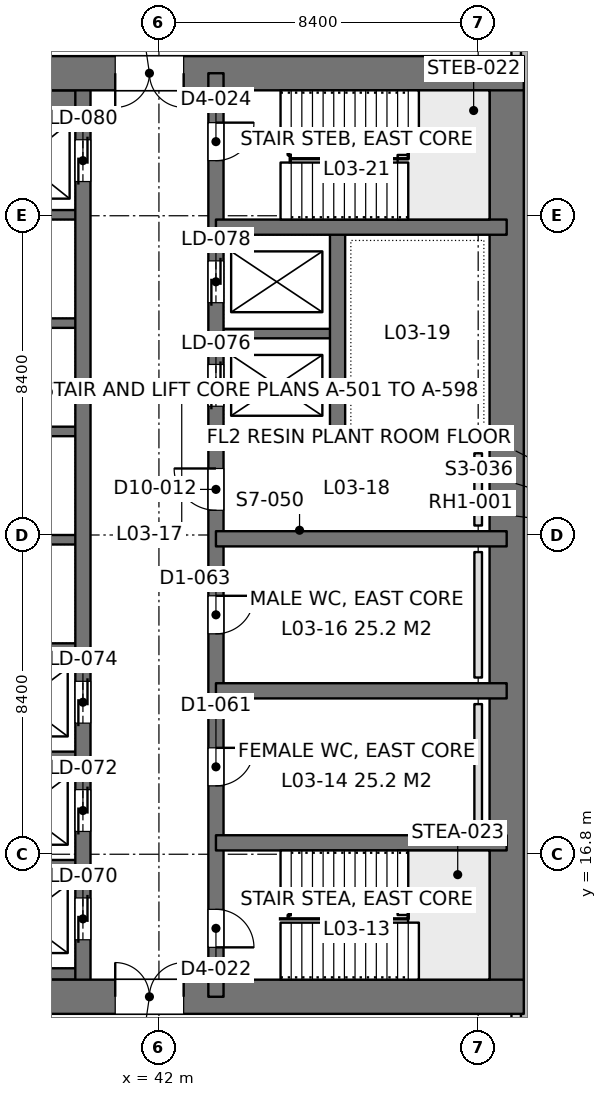
"""IFC4 building model, lengths in metres.
Left out: names, types, materials, properties, quantities, classifications, styles, units other than length and angle.
Written with IfcOpenShell. Run it as: python <this file> out.ifc"""

import sys

from ifc_helpers import new_model, si_unit, direction, frame, frame_2d, origin, place, context, subcontext, project, spatial, rectangle, extrude, element, fill, save


model = new_model("IFC4")
c1 = context("Model", 3, precision=1e-05, world=origin(), true_north=direction((0.0, 1.0)))
c2 = subcontext(c1, "Body", "Model", "MODEL_VIEW")
j1 = project(units=[si_unit("LENGTHUNIT", "METRE"), si_unit("PLANEANGLEUNIT", "RADIAN")], contexts=[c1])
p1 = place(None, origin())
s1 = spatial("IfcSite", under=j1, at=p1, CompositionType="ELEMENT")
p2 = place(p1, origin())
s2 = spatial("IfcBuilding", under=s1, at=p2, CompositionType="ELEMENT")
p3 = place(p2, frame((0.0, 0.0, 14.4)))
s3 = spatial("IfcBuildingStorey", under=s2, at=p3, CompositionType="ELEMENT", Elevation=14.4)
p4 = place(p3, frame((33.6, 13.05, 0.0), z_axis=(0.0, 0.0, 1.0), x_axis=(1.0, 0.0, 0.0)))
e1 = element("IfcWall", 1, at=p4, inside=s3, PredefinedType="SHEAR", context=c2, shape_type="SweptSolid", body=[
    extrude(rectangle(XDim=18.0, YDim=0.9, at=frame_2d((9.0, 0.0))), origin(), (0.0, 0.0, 1.0), 4.5),
])
p5 = place(p4, frame((7.25, 0.0, 0.0)))
e2 = element("IfcOpeningElement", 2, at=p5, cuts=e1, PredefinedType="OPENING", context=c2, shape_type="SweptSolid", body=[
    extrude(rectangle(XDim=1.8, YDim=2.4, at=frame_2d((0.9, 1.2))), frame((0.0, 0.46, 0.0), z_axis=(0.0, -1.0, 0.0), x_axis=(1.0, 0.0, 0.0)), (0.0, 0.0, 1.0), 0.92),
])
p6 = place(p3, frame((33.6, 37.35, 0.0), z_axis=(0.0, 0.0, 1.0), x_axis=(1.0, 0.0, 0.0)))
e3 = element("IfcWall", 3, at=p6, inside=s3, PredefinedType="SHEAR", context=c2, shape_type="SweptSolid", body=[
    extrude(rectangle(XDim=18.0, YDim=0.9, at=frame_2d((9.0, 0.0))), origin(), (0.0, 0.0, 1.0), 4.5),
])
p7 = place(p6, frame((7.25, 0.0, 0.0)))
e4 = element("IfcOpeningElement", 4, at=p7, cuts=e3, PredefinedType="OPENING", context=c2, shape_type="SweptSolid", body=[
    extrude(rectangle(XDim=1.8, YDim=2.4, at=frame_2d((0.9, 1.2))), frame((0.0, 0.46, 0.0), z_axis=(0.0, -1.0, 0.0), x_axis=(1.0, 0.0, 0.0)), (0.0, 0.0, 1.0), 0.92),
])
p8 = place(p3, frame((51.15, 13.05, 0.0), z_axis=(0.0, 0.0, 1.0), x_axis=(0.0, 1.0, 0.0)))
e5 = element("IfcWall", 5, at=p8, inside=s3, PredefinedType="SHEAR", context=c2, shape_type="SweptSolid", body=[
    extrude(rectangle(XDim=24.3, YDim=0.9, at=frame_2d((12.15, 0.0))), origin(), (0.0, 0.0, 1.0), 4.5),
])
p9 = place(p3, frame((43.5, 13.05, 0.0), z_axis=(0.0, 0.0, 1.0), x_axis=(0.0, 1.0, 0.0)))
e6 = element("IfcWall", 6, at=p9, inside=s3, PredefinedType="SHEAR", context=c2, shape_type="SweptSolid", body=[
    extrude(rectangle(XDim=24.3, YDim=0.4, at=frame_2d((12.15, 0.0))), origin(), (0.0, 0.0, 1.0), 4.5),
])
p10 = place(p9, frame((1.3, 0.0, 0.0)))
e7 = element("IfcOpeningElement", 7, at=p10, cuts=e6, PredefinedType="OPENING", context=c2, shape_type="SweptSolid", body=[
    extrude(rectangle(XDim=1.0, YDim=2.2, at=frame_2d((0.5, 1.1))), frame((0.0, 0.21, 0.0), z_axis=(0.0, -1.0, 0.0), x_axis=(1.0, 0.0, 0.0)), (0.0, 0.0, 1.0), 0.42),
])
p11 = place(p9, frame((22.0, 0.0, 0.0)))
e8 = element("IfcOpeningElement", 8, at=p11, cuts=e6, PredefinedType="OPENING", context=c2, shape_type="SweptSolid", body=[
    extrude(rectangle(XDim=1.0, YDim=2.2, at=frame_2d((0.5, 1.1))), frame((0.0, 0.21, 0.0), z_axis=(0.0, -1.0, 0.0), x_axis=(1.0, 0.0, 0.0)), (0.0, 0.0, 1.0), 0.42),
])
p12 = place(p9, frame((5.55, 0.0, 0.0)))
e9 = element("IfcOpeningElement", 9, at=p12, cuts=e6, PredefinedType="OPENING", context=c2, shape_type="SweptSolid", body=[
    extrude(rectangle(XDim=1.0, YDim=2.2, at=frame_2d((0.5, 1.1))), frame((0.0, 0.21, 0.0), z_axis=(0.0, -1.0, 0.0), x_axis=(1.0, 0.0, 0.0)), (0.0, 0.0, 1.0), 0.42),
])
p13 = place(p9, frame((9.55, 0.0, 0.0)))
e10 = element("IfcOpeningElement", 10, at=p13, cuts=e6, PredefinedType="OPENING", context=c2, shape_type="SweptSolid", body=[
    extrude(rectangle(XDim=1.0, YDim=2.2, at=frame_2d((0.5, 1.1))), frame((0.0, 0.21, 0.0), z_axis=(0.0, -1.0, 0.0), x_axis=(1.0, 0.0, 0.0)), (0.0, 0.0, 1.0), 0.42),
])
p14 = place(p9, frame((12.8, 0.0, 0.0)))
e11 = element("IfcOpeningElement", 11, at=p14, cuts=e6, PredefinedType="OPENING", context=c2, shape_type="SweptSolid", body=[
    extrude(rectangle(XDim=1.1, YDim=2.2, at=frame_2d((0.55, 1.1))), frame((0.0, 0.21, 0.0), z_axis=(0.0, -1.0, 0.0), x_axis=(1.0, 0.0, 0.0)), (0.0, 0.0, 1.0), 0.42),
])
p15 = place(p9, frame((15.538, 0.0, 0.0)))
e12 = element("IfcOpeningElement", 12, at=p15, cuts=e6, PredefinedType="OPENING", context=c2, shape_type="SweptSolid", body=[
    extrude(rectangle(XDim=1.1, YDim=2.2, at=frame_2d((0.55, 1.1))), frame((0.0, 0.21, 0.0), z_axis=(0.0, -1.0, 0.0), x_axis=(1.0, 0.0, 0.0)), (0.0, 0.0, 1.0), 0.42),
])
p16 = place(p9, frame((18.262, 0.0, 0.0)))
e13 = element("IfcOpeningElement", 13, at=p16, cuts=e6, PredefinedType="OPENING", context=c2, shape_type="SweptSolid", body=[
    extrude(rectangle(XDim=1.1, YDim=2.2, at=frame_2d((0.55, 1.1))), frame((0.0, 0.21, 0.0), z_axis=(0.0, -1.0, 0.0), x_axis=(1.0, 0.0, 0.0)), (0.0, 0.0, 1.0), 0.42),
])
p17 = place(p3, frame((40.0, 13.05, 0.0), z_axis=(0.0, 0.0, 1.0), x_axis=(0.0, 1.0, 0.0)))
e14 = element("IfcWall", 14, at=p17, inside=s3, PredefinedType="SHEAR", context=c2, shape_type="SweptSolid", body=[
    extrude(rectangle(XDim=24.3, YDim=0.4, at=frame_2d((12.15, 0.0))), origin(), (0.0, 0.0, 1.0), 4.5),
])
p18 = place(p17, frame((1.5, 0.0, 0.0)))
e15 = element("IfcOpeningElement", 15, at=p18, cuts=e14, PredefinedType="OPENING", context=c2, shape_type="SweptSolid", body=[
    extrude(rectangle(XDim=1.1, YDim=2.2, at=frame_2d((0.55, 1.1))), frame((0.0, 0.21, 0.0), z_axis=(0.0, -1.0, 0.0), x_axis=(1.0, 0.0, 0.0)), (0.0, 0.0, 1.0), 0.42),
])
p19 = place(p17, frame((4.35, 0.0, 0.0)))
e16 = element("IfcOpeningElement", 16, at=p19, cuts=e14, PredefinedType="OPENING", context=c2, shape_type="SweptSolid", body=[
    extrude(rectangle(XDim=1.1, YDim=2.2, at=frame_2d((0.55, 1.1))), frame((0.0, 0.21, 0.0), z_axis=(0.0, -1.0, 0.0), x_axis=(1.0, 0.0, 0.0)), (0.0, 0.0, 1.0), 0.42),
])
p20 = place(p17, frame((7.2, 0.0, 0.0)))
e17 = element("IfcOpeningElement", 17, at=p20, cuts=e14, PredefinedType="OPENING", context=c2, shape_type="SweptSolid", body=[
    extrude(rectangle(XDim=1.1, YDim=2.2, at=frame_2d((0.55, 1.1))), frame((0.0, 0.21, 0.0), z_axis=(0.0, -1.0, 0.0), x_axis=(1.0, 0.0, 0.0)), (0.0, 0.0, 1.0), 0.42),
])
p21 = place(p17, frame((21.45, 0.0, 0.0)))
e18 = element("IfcOpeningElement", 18, at=p21, cuts=e14, PredefinedType="OPENING", context=c2, shape_type="SweptSolid", body=[
    extrude(rectangle(XDim=1.1, YDim=2.2, at=frame_2d((0.55, 1.1))), frame((0.0, 0.21, 0.0), z_axis=(0.0, -1.0, 0.0), x_axis=(1.0, 0.0, 0.0)), (0.0, 0.0, 1.0), 0.42),
])
for number, where, z_axis, x_axis in (
    (19, (51.15, 17.1, 0.0), (0.0, 0.0, 1.0), (-1.0, 0.0, 0.0)),
    (20, (51.15, 21.1, 0.0), (0.0, 0.0, 1.0), (-1.0, 0.0, 0.0)),
    (21, (51.15, 25.1, 0.0), (0.0, 0.0, 1.0), (-1.0, 0.0, 0.0)),
    (22, (51.15, 27.7, 0.0), (0.0, 0.0, 1.0), (-1.0, 0.0, 0.0)),
    (23, (51.15, 33.3, 0.0), (0.0, 0.0, 1.0), (-1.0, 0.0, 0.0)),
):
    element("IfcWall", number, at=place(p3, frame(where, z_axis=z_axis, x_axis=x_axis)), inside=s3, PredefinedType="SHEAR", context=c2, shape_type="SweptSolid", body=[
        extrude(rectangle(XDim=7.65, YDim=0.4, at=frame_2d((3.825, 0.0))), origin(), (0.0, 0.0, 1.0), 4.5),
    ])
p22 = place(p3, frame((46.7, 27.7, 0.0), z_axis=(0.0, 0.0, 1.0), x_axis=(0.0, 1.0, 0.0)))
e24 = element("IfcWall", 24, at=p22, inside=s3, PredefinedType="SHEAR", context=c2, shape_type="SweptSolid", body=[
    extrude(rectangle(XDim=5.6, YDim=0.4, at=frame_2d((2.8, 0.0))), origin(), (0.0, 0.0, 1.0), 4.5),
])
p23 = place(p3, frame((46.7, 30.5, 0.0), z_axis=(0.0, 0.0, 1.0), x_axis=(-1.0, 0.0, 0.0)))
e25 = element("IfcWall", 25, at=p23, inside=s3, PredefinedType="SHEAR", context=c2, shape_type="SweptSolid", body=[
    extrude(rectangle(XDim=3.2, YDim=0.25, at=frame_2d((1.6, 0.0))), origin(), (0.0, 0.0, 1.0), 4.5),
])
p24 = place(p3, frame((40.0, 13.65, 0.0), z_axis=(0.0, 0.0, 1.0), x_axis=(-1.0, 0.0, 0.0)))
e26 = element("IfcWall", 26, at=p24, inside=s3, PredefinedType="SHEAR", context=c2, shape_type="SweptSolid", body=[
    extrude(rectangle(XDim=3.2, YDim=0.3, at=frame_2d((1.6, 0.0))), origin(), (0.0, 0.0, 1.0), 4.5),
])
for number, where, z_axis, x_axis in (
    (27, (40.0, 16.525, 0.0), (0.0, 0.0, 1.0), (-1.0, 0.0, 0.0)),
    (28, (40.0, 19.375, 0.0), (0.0, 0.0, 1.0), (-1.0, 0.0, 0.0)),
    (29, (40.0, 22.225, 0.0), (0.0, 0.0, 1.0), (-1.0, 0.0, 0.0)),
    (30, (40.0, 25.075, 0.0), (0.0, 0.0, 1.0), (-1.0, 0.0, 0.0)),
    (31, (40.0, 27.925, 0.0), (0.0, 0.0, 1.0), (-1.0, 0.0, 0.0)),
    (32, (40.0, 30.775, 0.0), (0.0, 0.0, 1.0), (-1.0, 0.0, 0.0)),
    (33, (40.0, 33.625, 0.0), (0.0, 0.0, 1.0), (-1.0, 0.0, 0.0)),
):
    element("IfcWall", number, at=place(p3, frame(where, z_axis=z_axis, x_axis=x_axis)), inside=s3, PredefinedType="SHEAR", context=c2, shape_type="SweptSolid", body=[
        extrude(rectangle(XDim=3.2, YDim=0.25, at=frame_2d((1.6, 0.0))), origin(), (0.0, 0.0, 1.0), 4.5),
    ])
p25 = place(p3, frame((40.0, 36.625, 0.0), z_axis=(0.0, 0.0, 1.0), x_axis=(-1.0, 0.0, 0.0)))
e34 = element("IfcWall", 34, at=p25, inside=s3, PredefinedType="SHEAR", context=c2, shape_type="SweptSolid", body=[
    extrude(rectangle(XDim=3.2, YDim=0.55, at=frame_2d((1.6, 0.0))), origin(), (0.0, 0.0, 1.0), 4.5),
])
p26 = place(p3, frame((51.4, 6.12, 0.0), z_axis=(0.0, 0.0, 1.0), x_axis=(0.0, 1.0, 0.0)))
e35 = element("IfcWall", 35, at=p26, inside=s3, PredefinedType="PARTITIONING", context=c2, shape_type="SweptSolid", body=[
    extrude(rectangle(XDim=6.482, YDim=0.25, at=frame_2d((3.241, 0.0))), origin(), (0.0, 0.0, 1.0), 3.45),
])
p27 = place(p26, frame((3.93, 0.0, 0.0)))
e36 = element("IfcOpeningElement", 36, at=p27, cuts=e35, PredefinedType="OPENING", context=c2, shape_type="SweptSolid", body=[
    extrude(rectangle(XDim=0.9, YDim=2.2, at=frame_2d((0.45, 1.1))), frame((0.0, 0.135, 0.0), z_axis=(0.0, -1.0, 0.0), x_axis=(1.0, 0.0, 0.0)), (0.0, 0.0, 1.0), 0.27),
])
p28 = place(p3, frame((51.4, 37.8, 0.0), z_axis=(0.0, 0.0, 1.0), x_axis=(0.0, 1.0, 0.0)))
e37 = element("IfcWall", 37, at=p28, inside=s3, PredefinedType="PARTITIONING", context=c2, shape_type="SweptSolid", body=[
    extrude(rectangle(XDim=13.6, YDim=0.25, at=frame_2d((6.8, 0.0))), origin(), (0.0, 0.0, 1.0), 3.45),
])
p29 = place(p28, frame((7.95, 0.0, 0.0)))
e38 = element("IfcOpeningElement", 38, at=p29, cuts=e37, PredefinedType="OPENING", context=c2, shape_type="SweptSolid", body=[
    extrude(rectangle(XDim=0.9, YDim=2.2, at=frame_2d((0.45, 1.1))), frame((0.0, 0.135, 0.0), z_axis=(0.0, -1.0, 0.0), x_axis=(1.0, 0.0, 0.0)), (0.0, 0.0, 1.0), 0.27),
])
for number, where, z_axis, x_axis in (
    (39, (50.4, 17.45, 0.0), (0.0, 0.0, 1.0), (0.0, 1.0, 0.0)),
    (40, (50.4, 21.45, 0.0), (0.0, 0.0, 1.0), (0.0, 1.0, 0.0)),
):
    element("IfcWall", number, at=place(p3, frame(where, z_axis=z_axis, x_axis=x_axis)), inside=s3, PredefinedType="PLUMBINGWALL", context=c2, shape_type="SweptSolid", body=[
        extrude(rectangle(XDim=3.3, YDim=0.2, at=frame_2d((1.65, 0.0))), origin(), (0.0, 0.0, 1.0), 1.2),
    ])
p30 = place(p3, frame((50.4, 25.45, 0.0), z_axis=(0.0, 0.0, 1.0), x_axis=(0.0, 1.0, 0.0)))
e41 = element("IfcWall", 41, at=p30, inside=s3, PredefinedType="PLUMBINGWALL", context=c2, shape_type="SweptSolid", body=[
    extrude(rectangle(XDim=1.9, YDim=0.2, at=frame_2d((0.95, 0.0))), origin(), (0.0, 0.0, 1.0), 1.2),
])
p31 = place(p5, origin())
e42 = element("IfcDoor", 42, at=p31, inside=s3, OperationType="DOUBLE_DOOR_SINGLE_SWING", PredefinedType="DOOR", context=c2, shape_type="SweptSolid", body=[
    extrude(rectangle(XDim=1.8, YDim=2.4, at=frame_2d((0.9, 1.2))), frame((0.0, 0.025, 0.0), z_axis=(0.0, -1.0, 0.0), x_axis=(1.0, 0.0, 0.0)), (0.0, 0.0, 1.0), 0.05),
])
fill(e2, e42)
p32 = place(p7, frame((1.8, 0.0, 0.0), z_axis=(0.0, 0.0, 1.0), x_axis=(-1.0, 0.0, 0.0)))
e43 = element("IfcDoor", 43, at=p32, inside=s3, OperationType="DOUBLE_DOOR_SINGLE_SWING", PredefinedType="DOOR", context=c2, shape_type="SweptSolid", body=[
    extrude(rectangle(XDim=1.8, YDim=2.4, at=frame_2d((0.9, 1.2))), frame((0.0, 0.025, 0.0), z_axis=(0.0, -1.0, 0.0), x_axis=(1.0, 0.0, 0.0)), (0.0, 0.0, 1.0), 0.05),
])
fill(e4, e43)
p33 = place(p10, frame((1.0, 0.0, 0.0), z_axis=(0.0, 0.0, 1.0), x_axis=(-1.0, 0.0, 0.0)))
e44 = element("IfcDoor", 44, at=p33, inside=s3, OperationType="SINGLE_SWING_RIGHT", PredefinedType="DOOR", context=c2, shape_type="SweptSolid", body=[
    extrude(rectangle(XDim=1.0, YDim=2.2, at=frame_2d((0.5, 1.1))), frame((0.0, 0.025, 0.0), z_axis=(0.0, -1.0, 0.0), x_axis=(1.0, 0.0, 0.0)), (0.0, 0.0, 1.0), 0.05),
])
fill(e7, e44)
p34 = place(p11, frame((1.0, 0.0, 0.0), z_axis=(0.0, 0.0, 1.0), x_axis=(-1.0, 0.0, 0.0)))
e45 = element("IfcDoor", 45, at=p34, inside=s3, OperationType="SINGLE_SWING_LEFT", PredefinedType="DOOR", context=c2, shape_type="SweptSolid", body=[
    extrude(rectangle(XDim=1.0, YDim=2.2, at=frame_2d((0.5, 1.1))), frame((0.0, 0.025, 0.0), z_axis=(0.0, -1.0, 0.0), x_axis=(1.0, 0.0, 0.0)), (0.0, 0.0, 1.0), 0.05),
])
fill(e8, e45)
p35 = place(p12, frame((1.0, 0.0, 0.0), z_axis=(0.0, 0.0, 1.0), x_axis=(-1.0, 0.0, 0.0)))
e46 = element("IfcDoor", 46, at=p35, inside=s3, OperationType="SINGLE_SWING_LEFT", PredefinedType="DOOR", context=c2, shape_type="SweptSolid", body=[
    extrude(rectangle(XDim=1.0, YDim=2.2, at=frame_2d((0.5, 1.1))), frame((0.0, 0.025, 0.0), z_axis=(0.0, -1.0, 0.0), x_axis=(1.0, 0.0, 0.0)), (0.0, 0.0, 1.0), 0.05),
])
fill(e9, e46)
p36 = place(p13, frame((1.0, 0.0, 0.0), z_axis=(0.0, 0.0, 1.0), x_axis=(-1.0, 0.0, 0.0)))
e47 = element("IfcDoor", 47, at=p36, inside=s3, OperationType="SINGLE_SWING_LEFT", PredefinedType="DOOR", context=c2, shape_type="SweptSolid", body=[
    extrude(rectangle(XDim=1.0, YDim=2.2, at=frame_2d((0.5, 1.1))), frame((0.0, 0.025, 0.0), z_axis=(0.0, -1.0, 0.0), x_axis=(1.0, 0.0, 0.0)), (0.0, 0.0, 1.0), 0.05),
])
fill(e10, e47)
p37 = place(p14, origin())
e48 = element("IfcDoor", 48, at=p37, inside=s3, OperationType="SINGLE_SWING_RIGHT", PredefinedType="DOOR", context=c2, shape_type="SweptSolid", body=[
    extrude(rectangle(XDim=1.1, YDim=2.2, at=frame_2d((0.55, 1.1))), frame((0.0, 0.025, 0.0), z_axis=(0.0, -1.0, 0.0), x_axis=(1.0, 0.0, 0.0)), (0.0, 0.0, 1.0), 0.05),
])
fill(e11, e48)
p38 = place(p18, origin())
e49 = element("IfcDoor", 49, at=p38, inside=s3, OperationType="DOUBLE_DOOR_SLIDING", PredefinedType="DOOR", context=c2, shape_type="SweptSolid", body=[
    extrude(rectangle(XDim=1.1, YDim=2.2, at=frame_2d((0.55, 1.1))), frame((0.0, 0.025, 0.0), z_axis=(0.0, -1.0, 0.0), x_axis=(1.0, 0.0, 0.0)), (0.0, 0.0, 1.0), 0.05),
])
fill(e15, e49)
p39 = place(p19, origin())
e50 = element("IfcDoor", 50, at=p39, inside=s3, OperationType="DOUBLE_DOOR_SLIDING", PredefinedType="DOOR", context=c2, shape_type="SweptSolid", body=[
    extrude(rectangle(XDim=1.1, YDim=2.2, at=frame_2d((0.55, 1.1))), frame((0.0, 0.025, 0.0), z_axis=(0.0, -1.0, 0.0), x_axis=(1.0, 0.0, 0.0)), (0.0, 0.0, 1.0), 0.05),
])
fill(e16, e50)
p40 = place(p20, origin())
e51 = element("IfcDoor", 51, at=p40, inside=s3, OperationType="DOUBLE_DOOR_SLIDING", PredefinedType="DOOR", context=c2, shape_type="SweptSolid", body=[
    extrude(rectangle(XDim=1.1, YDim=2.2, at=frame_2d((0.55, 1.1))), frame((0.0, 0.025, 0.0), z_axis=(0.0, -1.0, 0.0), x_axis=(1.0, 0.0, 0.0)), (0.0, 0.0, 1.0), 0.05),
])
fill(e17, e51)
p41 = place(p21, origin())
e52 = element("IfcDoor", 52, at=p41, inside=s3, OperationType="DOUBLE_DOOR_SLIDING", PredefinedType="DOOR", context=c2, shape_type="SweptSolid", body=[
    extrude(rectangle(XDim=1.1, YDim=2.2, at=frame_2d((0.55, 1.1))), frame((0.0, 0.025, 0.0), z_axis=(0.0, -1.0, 0.0), x_axis=(1.0, 0.0, 0.0)), (0.0, 0.0, 1.0), 0.05),
])
fill(e18, e52)
p42 = place(p15, origin())
e53 = element("IfcDoor", 53, at=p42, inside=s3, OperationType="DOUBLE_DOOR_SLIDING", PredefinedType="DOOR", context=c2, shape_type="SweptSolid", body=[
    extrude(rectangle(XDim=1.1, YDim=2.2, at=frame_2d((0.55, 1.1))), frame((0.0, 0.025, 0.0), z_axis=(0.0, -1.0, 0.0), x_axis=(1.0, 0.0, 0.0)), (0.0, 0.0, 1.0), 0.05),
])
fill(e12, e53)
p43 = place(p16, origin())
e54 = element("IfcDoor", 54, at=p43, inside=s3, OperationType="DOUBLE_DOOR_SLIDING", PredefinedType="DOOR", context=c2, shape_type="SweptSolid", body=[
    extrude(rectangle(XDim=1.1, YDim=2.2, at=frame_2d((0.55, 1.1))), frame((0.0, 0.025, 0.0), z_axis=(0.0, -1.0, 0.0), x_axis=(1.0, 0.0, 0.0)), (0.0, 0.0, 1.0), 0.05),
])
fill(e13, e54)
save(model, sys.argv[1])
